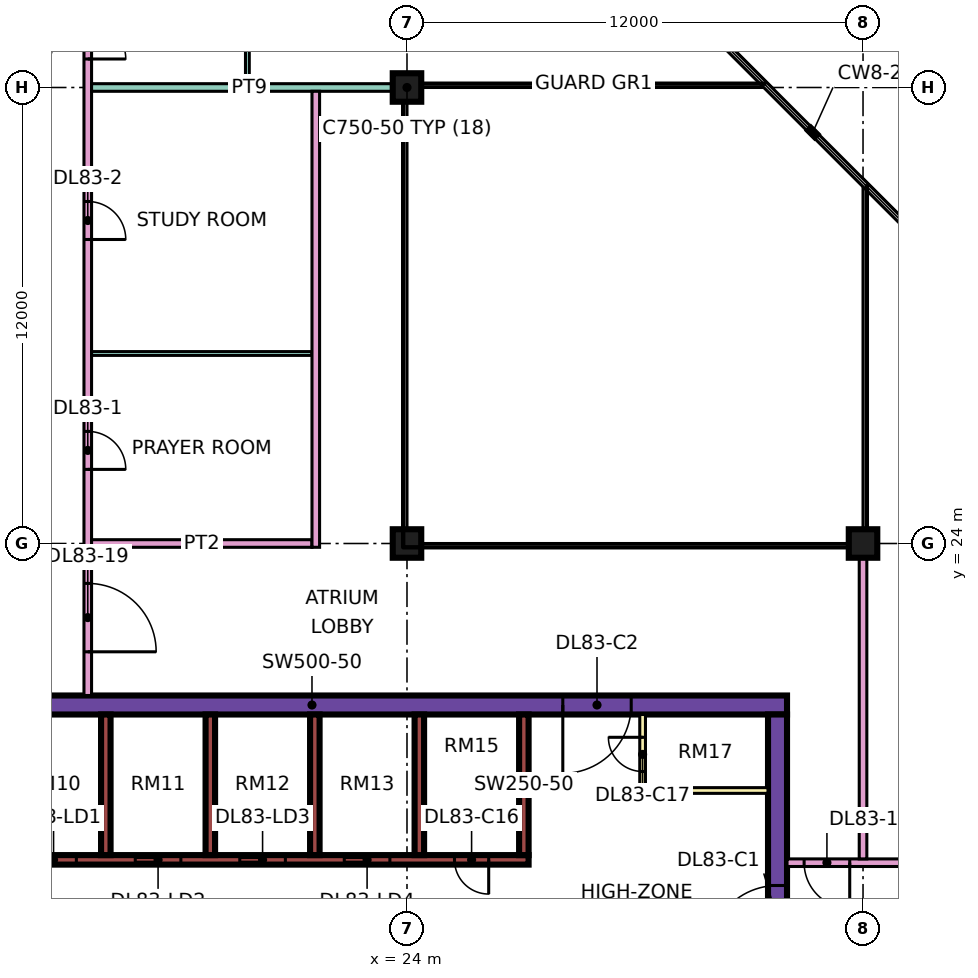
"""IFC4 building model, lengths in metres.
Left out: names, types, materials, properties, quantities, classifications, styles, units other than length and angle.
Written with IfcOpenShell. Run it as: python <this file> out.ifc"""

import sys

from ifc_helpers import new_model, si_unit, direction, frame, frame_2d, origin, origin_2d, place, context, subcontext, project, spatial, rectangle, extrude, element, fill, save


model = new_model("IFC4")
c1 = context("Model", 3, precision=1e-05, world=origin(), true_north=direction((0.0, 1.0)))
c2 = subcontext(c1, "Body", "Model", "MODEL_VIEW")
j1 = project(units=[si_unit("LENGTHUNIT", "METRE"), si_unit("PLANEANGLEUNIT", "RADIAN")], contexts=[c1])
p1 = place(None, origin())
s1 = spatial("IfcSite", under=j1, at=p1, CompositionType="ELEMENT")
p2 = place(p1, origin())
s2 = spatial("IfcBuilding", under=s1, at=p2, CompositionType="ELEMENT")
p3 = place(p2, frame((0.0, 0.0, 357.65)))
s3 = spatial("IfcBuildingStorey", under=s2, at=p3, CompositionType="ELEMENT", Elevation=357.65)
for number, where, z_axis, x_axis in (
    (1, (24.0, 24.0, 0.0), (0.0, 0.0, 1.0), (1.0, 0.0, 0.0)),
    (2, (24.0, 36.0, 0.0), (0.0, 0.0, 1.0), (1.0, 0.0, 0.0)),
    (3, (36.0, 24.0, 0.0), (0.0, 0.0, 1.0), (1.0, 0.0, 0.0)),
):
    element("IfcColumn", number, at=place(p3, frame(where, z_axis=z_axis, x_axis=x_axis)), inside=s3, PredefinedType="COLUMN", context=c2, shape_type="SweptSolid", body=[
        extrude(rectangle(XDim=0.75, YDim=0.75, at=origin_2d()), origin(), (0.0, 0.0, 1.0), 3.75),
    ])
p4 = place(p3, frame((9.0, 19.75, 0.0), z_axis=(0.0, 0.0, 1.0), x_axis=(1.0, 0.0, 0.0)))
e4 = element("IfcWall", 4, at=p4, inside=s3, PredefinedType="SHEAR", context=c2, shape_type="SweptSolid", body=[
    extrude(rectangle(XDim=25.0, YDim=0.5, at=frame_2d((12.5, 0.0))), origin(), (0.0, 0.0, 1.0), 3.75),
])
p5 = place(p4, frame((19.1, 0.0, 0.0)))
e5 = element("IfcOpeningElement", 5, at=p5, cuts=e4, PredefinedType="OPENING", context=c2, shape_type="SweptSolid", body=[
    extrude(rectangle(XDim=1.8, YDim=2.4, at=frame_2d((0.9, 1.2))), frame((0.0, 0.26, 0.0), z_axis=(0.0, -1.0, 0.0), x_axis=(1.0, 0.0, 0.0)), (0.0, 0.0, 1.0), 0.52),
])
p6 = place(p3, frame((33.75, 7.5, 0.0), z_axis=(0.0, 0.0, 1.0), x_axis=(0.0, 1.0, 0.0)))
e6 = element("IfcWall", 6, at=p6, inside=s3, PredefinedType="SHEAR", context=c2, shape_type="SweptSolid", body=[
    extrude(rectangle(XDim=12.0, YDim=0.5, at=frame_2d((6.0, 0.0))), origin(), (0.0, 0.0, 1.0), 3.75),
])
p7 = place(p6, frame((5.7, 0.0, 0.0)))
e7 = element("IfcOpeningElement", 7, at=p7, cuts=e6, PredefinedType="OPENING", context=c2, shape_type="SweptSolid", body=[
    extrude(rectangle(XDim=1.8, YDim=2.4, at=frame_2d((0.9, 1.2))), frame((0.0, 0.26, 0.0), z_axis=(0.0, -1.0, 0.0), x_axis=(1.0, 0.0, 0.0)), (0.0, 0.0, 1.0), 0.52),
])
p8 = place(p3, frame((13.45, 15.675, 0.0), z_axis=(0.0, 0.0, 1.0), x_axis=(1.0, 0.0, 0.0)))
e8 = element("IfcWall", 8, at=p8, inside=s3, PredefinedType="SHEAR", context=c2, shape_type="SweptSolid", body=[
    extrude(rectangle(XDim=13.75, YDim=0.25, at=frame_2d((6.875, 0.0))), origin(), (0.0, 0.0, 1.0), 3.75),
])
p9 = place(p8, frame((0.65, 0.0, 0.0)))
e9 = element("IfcOpeningElement", 9, at=p9, cuts=e8, PredefinedType="OPENING", context=c2, shape_type="SweptSolid", body=[
    extrude(rectangle(XDim=1.2, YDim=2.2, at=frame_2d((0.6, 1.1))), frame((0.0, 0.135, 0.0), z_axis=(0.0, -1.0, 0.0), x_axis=(1.0, 0.0, 0.0)), (0.0, 0.0, 1.0), 0.27),
])
p10 = place(p8, frame((3.4, 0.0, 0.0)))
e10 = element("IfcOpeningElement", 10, at=p10, cuts=e8, PredefinedType="OPENING", context=c2, shape_type="SweptSolid", body=[
    extrude(rectangle(XDim=1.2, YDim=2.2, at=frame_2d((0.6, 1.1))), frame((0.0, 0.135, 0.0), z_axis=(0.0, -1.0, 0.0), x_axis=(1.0, 0.0, 0.0)), (0.0, 0.0, 1.0), 0.27),
])
p11 = place(p8, frame((6.15, 0.0, 0.0)))
e11 = element("IfcOpeningElement", 11, at=p11, cuts=e8, PredefinedType="OPENING", context=c2, shape_type="SweptSolid", body=[
    extrude(rectangle(XDim=1.2, YDim=2.2, at=frame_2d((0.6, 1.1))), frame((0.0, 0.135, 0.0), z_axis=(0.0, -1.0, 0.0), x_axis=(1.0, 0.0, 0.0)), (0.0, 0.0, 1.0), 0.27),
])
p12 = place(p8, frame((8.9, 0.0, 0.0)))
e12 = element("IfcOpeningElement", 12, at=p12, cuts=e8, PredefinedType="OPENING", context=c2, shape_type="SweptSolid", body=[
    extrude(rectangle(XDim=1.2, YDim=2.2, at=frame_2d((0.6, 1.1))), frame((0.0, 0.135, 0.0), z_axis=(0.0, -1.0, 0.0), x_axis=(1.0, 0.0, 0.0)), (0.0, 0.0, 1.0), 0.27),
])
p13 = place(p8, frame((11.8, 0.0, 0.0)))
e13 = element("IfcOpeningElement", 13, at=p13, cuts=e8, PredefinedType="OPENING", context=c2, shape_type="SweptSolid", body=[
    extrude(rectangle(XDim=0.9, YDim=2.1, at=frame_2d((0.45, 1.05))), frame((0.0, 0.135, 0.0), z_axis=(0.0, -1.0, 0.0), x_axis=(1.0, 0.0, 0.0)), (0.0, 0.0, 1.0), 0.27),
])
for number, where, z_axis, x_axis in (
    (14, (16.075, 15.8, 0.0), (0.0, 0.0, 1.0), (0.0, 1.0, 0.0)),
    (15, (18.825, 15.8, 0.0), (0.0, 0.0, 1.0), (0.0, 1.0, 0.0)),
    (16, (21.575, 15.8, 0.0), (0.0, 0.0, 1.0), (0.0, 1.0, 0.0)),
    (17, (24.325, 15.8, 0.0), (0.0, 0.0, 1.0), (0.0, 1.0, 0.0)),
    (18, (27.075, 15.8, 0.0), (0.0, 0.0, 1.0), (0.0, 1.0, 0.0)),
):
    element("IfcWall", number, at=place(p3, frame(where, z_axis=z_axis, x_axis=x_axis)), inside=s3, PredefinedType="SHEAR", context=c2, shape_type="SweptSolid", body=[
        extrude(rectangle(XDim=3.7, YDim=0.25, at=frame_2d((1.85, 0.0))), origin(), (0.0, 0.0, 1.0), 3.75),
    ])
p14 = place(p3, frame((30.2, 17.5, 0.0), z_axis=(0.0, 0.0, 1.0), x_axis=(0.0, 1.0, 0.0)))
e19 = element("IfcWall", 19, at=p14, inside=s3, PredefinedType="PARTITIONING", context=c2, shape_type="SweptSolid", body=[
    extrude(rectangle(XDim=2.0, YDim=0.15, at=frame_2d((1.0, 0.0))), origin(), (0.0, 0.0, 1.0), 3.35),
])
p15 = place(p14, frame((0.5, 0.0, 0.0)))
e20 = element("IfcOpeningElement", 20, at=p15, cuts=e19, PredefinedType="OPENING", context=c2, shape_type="SweptSolid", body=[
    extrude(rectangle(XDim=0.9, YDim=2.1, at=frame_2d((0.45, 1.05))), frame((0.0, 0.085, 0.0), z_axis=(0.0, -1.0, 0.0), x_axis=(1.0, 0.0, 0.0)), (0.0, 0.0, 1.0), 0.17),
])
p16 = place(p3, frame((30.2, 17.5, 0.0), z_axis=(0.0, 0.0, 1.0), x_axis=(1.0, 0.0, 0.0)))
e21 = element("IfcWall", 21, at=p16, inside=s3, PredefinedType="PARTITIONING", context=c2, shape_type="SweptSolid", body=[
    extrude(rectangle(XDim=3.3, YDim=0.15, at=frame_2d((1.65, 0.0))), origin(), (0.0, 0.0, 1.0), 3.35),
])
p17 = place(p3, frame((15.6, 20.0, 0.0), z_axis=(0.0, 0.0, 1.0), x_axis=(0.0, 1.0, 0.0)))
e22 = element("IfcWall", 22, at=p17, inside=s3, PredefinedType="PARTITIONING", context=c2, shape_type="SweptSolid", body=[
    extrude(rectangle(XDim=27.775, YDim=0.2, at=frame_2d((13.887, 0.0))), origin(), (0.0, 0.0, 1.0), 3.35),
])
p18 = place(p17, frame((5.95, 0.0, 0.0)))
e23 = element("IfcOpeningElement", 23, at=p18, cuts=e22, PredefinedType="OPENING", context=c2, shape_type="SweptSolid", body=[
    extrude(rectangle(XDim=1.0, YDim=2.1, at=frame_2d((0.5, 1.05))), frame((0.0, 0.11, 0.0), z_axis=(0.0, -1.0, 0.0), x_axis=(1.0, 0.0, 0.0)), (0.0, 0.0, 1.0), 0.22),
])
p19 = place(p17, frame((12.0, 0.0, 0.0)))
e24 = element("IfcOpeningElement", 24, at=p19, cuts=e22, PredefinedType="OPENING", context=c2, shape_type="SweptSolid", body=[
    extrude(rectangle(XDim=1.0, YDim=2.1, at=frame_2d((0.5, 1.05))), frame((0.0, 0.11, 0.0), z_axis=(0.0, -1.0, 0.0), x_axis=(1.0, 0.0, 0.0)), (0.0, 0.0, 1.0), 0.22),
])
p20 = place(p17, frame((16.75, 0.0, 0.0)))
e25 = element("IfcOpeningElement", 25, at=p20, cuts=e22, PredefinedType="OPENING", context=c2, shape_type="SweptSolid", body=[
    extrude(rectangle(XDim=1.0, YDim=2.1, at=frame_2d((0.5, 1.05))), frame((0.0, 0.11, 0.0), z_axis=(0.0, -1.0, 0.0), x_axis=(1.0, 0.0, 0.0)), (0.0, 0.0, 1.0), 0.22),
])
p21 = place(p17, frame((1.15, 0.0, 0.0)))
e26 = element("IfcOpeningElement", 26, at=p21, cuts=e22, PredefinedType="OPENING", context=c2, shape_type="SweptSolid", body=[
    extrude(rectangle(XDim=1.8, YDim=2.1, at=frame_2d((0.9, 1.05))), frame((0.0, 0.11, 0.0), z_axis=(0.0, -1.0, 0.0), x_axis=(1.0, 0.0, 0.0)), (0.0, 0.0, 1.0), 0.22),
])
p22 = place(p17, frame((25.9, 0.0, 0.0)))
e27 = element("IfcOpeningElement", 27, at=p22, cuts=e22, PredefinedType="OPENING", context=c2, shape_type="SweptSolid", body=[
    extrude(rectangle(XDim=1.0, YDim=2.1, at=frame_2d((0.5, 1.05))), frame((0.0, 0.11, 0.0), z_axis=(0.0, -1.0, 0.0), x_axis=(1.0, 0.0, 0.0)), (0.0, 0.0, 1.0), 0.22),
])
p23 = place(p3, frame((15.7, 24.0, 0.0), z_axis=(0.0, 0.0, 1.0), x_axis=(1.0, 0.0, 0.0)))
e28 = element("IfcWall", 28, at=p23, inside=s3, PredefinedType="PARTITIONING", context=c2, shape_type="SweptSolid", body=[
    extrude(rectangle(XDim=5.8, YDim=0.2, at=frame_2d((2.9, 0.0))), origin(), (0.0, 0.0, 1.0), 3.35),
])
p24 = place(p3, frame((15.7, 29.0, 0.0), z_axis=(0.0, 0.0, 1.0), x_axis=(1.0, 0.0, 0.0)))
e29 = element("IfcWall", 29, at=p24, inside=s3, PredefinedType="PARTITIONING", context=c2, shape_type="SweptSolid", body=[
    extrude(rectangle(XDim=5.8, YDim=0.1, at=frame_2d((2.9, 0.0))), origin(), (0.0, 0.0, 1.0), 3.35),
])
p25 = place(p3, frame((15.7, 36.0, 0.0), z_axis=(0.0, 0.0, 1.0), x_axis=(1.0, 0.0, 0.0)))
e30 = element("IfcWall", 30, at=p25, inside=s3, PredefinedType="PARTITIONING", context=c2, shape_type="SweptSolid", body=[
    extrude(rectangle(XDim=8.3, YDim=0.2, at=frame_2d((4.15, 0.0))), origin(), (0.0, 0.0, 1.0), 3.35),
])
p26 = place(p3, frame((19.8, 36.1, 0.0), z_axis=(0.0, 0.0, 1.0), x_axis=(0.0, 1.0, 0.0)))
e31 = element("IfcWall", 31, at=p26, inside=s3, PredefinedType="PARTITIONING", context=c2, shape_type="SweptSolid", body=[
    extrude(rectangle(XDim=2.85, YDim=0.1, at=frame_2d((1.425, 0.0))), origin(), (0.0, 0.0, 1.0), 3.35),
])
p27 = place(p3, frame((21.6, 23.9, 0.0), z_axis=(0.0, 0.0, 1.0), x_axis=(0.0, 1.0, 0.0)))
e32 = element("IfcWall", 32, at=p27, inside=s3, PredefinedType="PARTITIONING", context=c2, shape_type="SweptSolid", body=[
    extrude(rectangle(XDim=12.0, YDim=0.2, at=frame_2d((6.0, 0.0))), origin(), (0.0, 0.0, 1.0), 3.35),
])
p28 = place(p3, frame((34.0, 15.6, 0.0), z_axis=(0.0, 0.0, 1.0), x_axis=(1.0, 0.0, 0.0)))
e33 = element("IfcWall", 33, at=p28, inside=s3, PredefinedType="PARTITIONING", context=c2, shape_type="SweptSolid", body=[
    extrude(rectangle(XDim=10.35, YDim=0.2, at=frame_2d((5.175, 0.0))), origin(), (0.0, 0.0, 1.0), 3.35),
])
p29 = place(p28, frame((5.6, 0.0, 0.0)))
e34 = element("IfcOpeningElement", 34, at=p29, cuts=e33, PredefinedType="OPENING", context=c2, shape_type="SweptSolid", body=[
    extrude(rectangle(XDim=1.0, YDim=2.1, at=frame_2d((0.5, 1.05))), frame((0.0, 0.11, 0.0), z_axis=(0.0, -1.0, 0.0), x_axis=(1.0, 0.0, 0.0)), (0.0, 0.0, 1.0), 0.22),
])
p30 = place(p28, frame((0.45, 0.0, 0.0)))
e35 = element("IfcOpeningElement", 35, at=p30, cuts=e33, PredefinedType="OPENING", context=c2, shape_type="SweptSolid", body=[
    extrude(rectangle(XDim=1.2, YDim=2.1, at=frame_2d((0.6, 1.05))), frame((0.0, 0.11, 0.0), z_axis=(0.0, -1.0, 0.0), x_axis=(1.0, 0.0, 0.0)), (0.0, 0.0, 1.0), 0.22),
])
p31 = place(p3, frame((36.0, 15.7, 0.0), z_axis=(0.0, 0.0, 1.0), x_axis=(0.0, 1.0, 0.0)))
e36 = element("IfcWall", 36, at=p31, inside=s3, PredefinedType="PARTITIONING", context=c2, shape_type="SweptSolid", body=[
    extrude(rectangle(XDim=8.3, YDim=0.2, at=frame_2d((4.15, 0.0))), origin(), (0.0, 0.0, 1.0), 3.35),
])
p32 = place(p9, origin())
e37 = element("IfcDoor", 37, at=p32, inside=s3, OperationType="DOUBLE_DOOR_SLIDING", PredefinedType="DOOR", context=c2, shape_type="SweptSolid", body=[
    extrude(rectangle(XDim=1.2, YDim=2.2, at=frame_2d((0.6, 1.1))), frame((0.0, 0.025, 0.0), z_axis=(0.0, -1.0, 0.0), x_axis=(1.0, 0.0, 0.0)), (0.0, 0.0, 1.0), 0.05),
])
fill(e9, e37)
p33 = place(p10, origin())
e38 = element("IfcDoor", 38, at=p33, inside=s3, OperationType="DOUBLE_DOOR_SLIDING", PredefinedType="DOOR", context=c2, shape_type="SweptSolid", body=[
    extrude(rectangle(XDim=1.2, YDim=2.2, at=frame_2d((0.6, 1.1))), frame((0.0, 0.025, 0.0), z_axis=(0.0, -1.0, 0.0), x_axis=(1.0, 0.0, 0.0)), (0.0, 0.0, 1.0), 0.05),
])
fill(e10, e38)
p34 = place(p11, origin())
e39 = element("IfcDoor", 39, at=p34, inside=s3, OperationType="DOUBLE_DOOR_SLIDING", PredefinedType="DOOR", context=c2, shape_type="SweptSolid", body=[
    extrude(rectangle(XDim=1.2, YDim=2.2, at=frame_2d((0.6, 1.1))), frame((0.0, 0.025, 0.0), z_axis=(0.0, -1.0, 0.0), x_axis=(1.0, 0.0, 0.0)), (0.0, 0.0, 1.0), 0.05),
])
fill(e11, e39)
p35 = place(p12, origin())
e40 = element("IfcDoor", 40, at=p35, inside=s3, OperationType="DOUBLE_DOOR_SLIDING", PredefinedType="DOOR", context=c2, shape_type="SweptSolid", body=[
    extrude(rectangle(XDim=1.2, YDim=2.2, at=frame_2d((0.6, 1.1))), frame((0.0, 0.025, 0.0), z_axis=(0.0, -1.0, 0.0), x_axis=(1.0, 0.0, 0.0)), (0.0, 0.0, 1.0), 0.05),
])
fill(e12, e40)
p36 = place(p7, origin())
e41 = element("IfcDoor", 41, at=p36, inside=s3, OperationType="DOUBLE_DOOR_SINGLE_SWING", PredefinedType="DOOR", context=c2, shape_type="SweptSolid", body=[
    extrude(rectangle(XDim=1.8, YDim=2.4, at=frame_2d((0.9, 1.2))), frame((0.0, 0.025, 0.0), z_axis=(0.0, -1.0, 0.0), x_axis=(1.0, 0.0, 0.0)), (0.0, 0.0, 1.0), 0.05),
])
fill(e7, e41)
p37 = place(p5, frame((1.8, 0.0, 0.0), z_axis=(0.0, 0.0, 1.0), x_axis=(-1.0, 0.0, 0.0)))
e42 = element("IfcDoor", 42, at=p37, inside=s3, OperationType="DOUBLE_DOOR_SINGLE_SWING", PredefinedType="DOOR", context=c2, shape_type="SweptSolid", body=[
    extrude(rectangle(XDim=1.8, YDim=2.4, at=frame_2d((0.9, 1.2))), frame((0.0, 0.025, 0.0), z_axis=(0.0, -1.0, 0.0), x_axis=(1.0, 0.0, 0.0)), (0.0, 0.0, 1.0), 0.05),
])
fill(e5, e42)
p38 = place(p13, origin())
e43 = element("IfcDoor", 43, at=p38, inside=s3, OperationType="SINGLE_SWING_RIGHT", PredefinedType="DOOR", context=c2, shape_type="SweptSolid", body=[
    extrude(rectangle(XDim=0.9, YDim=2.1, at=frame_2d((0.45, 1.05))), frame((0.0, 0.025, 0.0), z_axis=(0.0, -1.0, 0.0), x_axis=(1.0, 0.0, 0.0)), (0.0, 0.0, 1.0), 0.05),
])
fill(e13, e43)
p39 = place(p15, frame((0.9, 0.0, 0.0), z_axis=(0.0, 0.0, 1.0), x_axis=(-1.0, 0.0, 0.0)))
e44 = element("IfcDoor", 44, at=p39, inside=s3, OperationType="SINGLE_SWING_RIGHT", PredefinedType="DOOR", context=c2, shape_type="SweptSolid", body=[
    extrude(rectangle(XDim=0.9, YDim=2.1, at=frame_2d((0.45, 1.05))), frame((0.0, 0.025, 0.0), z_axis=(0.0, -1.0, 0.0), x_axis=(1.0, 0.0, 0.0)), (0.0, 0.0, 1.0), 0.05),
])
fill(e20, e44)
p40 = place(p18, frame((1.0, 0.0, 0.0), z_axis=(0.0, 0.0, 1.0), x_axis=(-1.0, 0.0, 0.0)))
e45 = element("IfcDoor", 45, at=p40, inside=s3, OperationType="SINGLE_SWING_LEFT", PredefinedType="DOOR", context=c2, shape_type="SweptSolid", body=[
    extrude(rectangle(XDim=1.0, YDim=2.1, at=frame_2d((0.5, 1.05))), frame((0.0, 0.025, 0.0), z_axis=(0.0, -1.0, 0.0), x_axis=(1.0, 0.0, 0.0)), (0.0, 0.0, 1.0), 0.05),
])
fill(e23, e45)
p41 = place(p19, frame((1.0, 0.0, 0.0), z_axis=(0.0, 0.0, 1.0), x_axis=(-1.0, 0.0, 0.0)))
e46 = element("IfcDoor", 46, at=p41, inside=s3, OperationType="SINGLE_SWING_LEFT", PredefinedType="DOOR", context=c2, shape_type="SweptSolid", body=[
    extrude(rectangle(XDim=1.0, YDim=2.1, at=frame_2d((0.5, 1.05))), frame((0.0, 0.025, 0.0), z_axis=(0.0, -1.0, 0.0), x_axis=(1.0, 0.0, 0.0)), (0.0, 0.0, 1.0), 0.05),
])
fill(e24, e46)
p42 = place(p20, frame((1.0, 0.0, 0.0), z_axis=(0.0, 0.0, 1.0), x_axis=(-1.0, 0.0, 0.0)))
e47 = element("IfcDoor", 47, at=p42, inside=s3, OperationType="SINGLE_SWING_LEFT", PredefinedType="DOOR", context=c2, shape_type="SweptSolid", body=[
    extrude(rectangle(XDim=1.0, YDim=2.1, at=frame_2d((0.5, 1.05))), frame((0.0, 0.025, 0.0), z_axis=(0.0, -1.0, 0.0), x_axis=(1.0, 0.0, 0.0)), (0.0, 0.0, 1.0), 0.05),
])
fill(e25, e47)
p43 = place(p30, origin())
e48 = element("IfcDoor", 48, at=p43, inside=s3, OperationType="SINGLE_SWING_RIGHT", PredefinedType="DOOR", context=c2, shape_type="SweptSolid", body=[
    extrude(rectangle(XDim=1.2, YDim=2.1, at=frame_2d((0.6, 1.05))), frame((0.0, 0.025, 0.0), z_axis=(0.0, -1.0, 0.0), x_axis=(1.0, 0.0, 0.0)), (0.0, 0.0, 1.0), 0.05),
])
fill(e35, e48)
p44 = place(p21, frame((1.8, 0.0, 0.0), z_axis=(0.0, 0.0, 1.0), x_axis=(-1.0, 0.0, 0.0)))
e49 = element("IfcDoor", 49, at=p44, inside=s3, OperationType="DOUBLE_DOOR_SINGLE_SWING", PredefinedType="DOOR", context=c2, shape_type="SweptSolid", body=[
    extrude(rectangle(XDim=1.8, YDim=2.1, at=frame_2d((0.9, 1.05))), frame((0.0, 0.025, 0.0), z_axis=(0.0, -1.0, 0.0), x_axis=(1.0, 0.0, 0.0)), (0.0, 0.0, 1.0), 0.05),
])
fill(e26, e49)
save(model, sys.argv[1])
